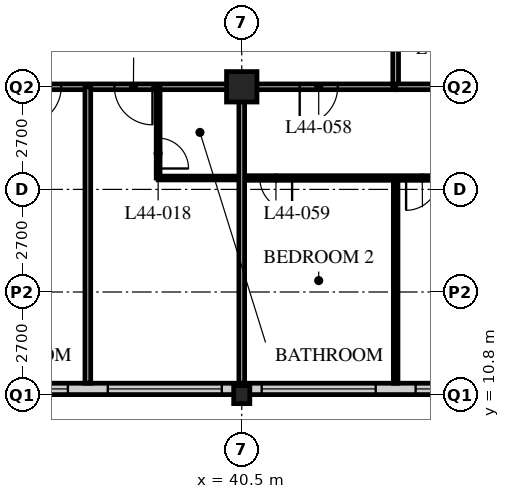
"""IFC4 building model, lengths in metres.
Left out: names, types, materials, properties, quantities, classifications, styles, units other than length and angle.
Written with IfcOpenShell. Run it as: python <this file> out.ifc"""

import sys

from ifc_helpers import new_model, si_unit, direction, frame, frame_2d, origin, origin_2d, place, context, subcontext, project, spatial, rectangle, hollow_rectangle, i_section, extrude, element, fill, save


model = new_model("IFC4")
c1 = context("Model", 3, precision=1e-05, world=origin(), true_north=direction((0.0, 1.0)))
c2 = subcontext(c1, "Body", "Model", "MODEL_VIEW")
j1 = project(units=[si_unit("LENGTHUNIT", "METRE"), si_unit("PLANEANGLEUNIT", "RADIAN")], contexts=[c1])
p1 = place(None, origin())
s1 = spatial("IfcSite", under=j1, at=p1, CompositionType="ELEMENT")
p2 = place(p1, origin())
s2 = spatial("IfcBuilding", under=s1, at=p2, CompositionType="ELEMENT")
p3 = place(p2, frame((0.0, 0.0, 174.0)))
s3 = spatial("IfcBuildingStorey", under=s2, at=p3, CompositionType="ELEMENT", Elevation=174.0)
p4 = place(p3, frame((40.5, 10.8, 0.0), z_axis=(0.0, 0.0, 1.0), x_axis=(1.0, 0.0, 0.0)))
e1 = element("IfcColumn", 1, at=p4, inside=s3, PredefinedType="COLUMN", context=c2, shape_type="SweptSolid", body=[
    extrude(i_section(OverallWidth=0.424, OverallDepth=0.475, WebThickness=0.048, FlangeThickness=0.077, FilletRadius=0.015, at=origin_2d()), origin(), (0.0, 0.0, 1.0), 3.6),
])
p5 = place(p3, frame((40.5, 18.9, 0.0), z_axis=(0.0, 0.0, 1.0), x_axis=(1.0, 0.0, 0.0)))
e2 = element("IfcColumn", 2, at=p5, inside=s3, PredefinedType="COLUMN", context=c2, shape_type="SweptSolid", body=[
    extrude(hollow_rectangle(XDim=0.8, YDim=0.8, WallThickness=0.08, at=origin_2d()), origin(), (0.0, 0.0, 1.0), 3.6),
])
p6 = place(p3, frame((8.4, 10.95, 0.0), z_axis=(0.0, 0.0, 1.0), x_axis=(1.0, 0.0, 0.0)))
e3 = element("IfcWall", 3, at=p6, inside=s3, PredefinedType="SOLIDWALL", context=c2, shape_type="SweptSolid", body=[
    extrude(rectangle(XDim=40.2, YDim=0.3, at=frame_2d((20.1, 0.0))), origin(), (0.0, 0.0, 1.0), 3.39),
])
p7 = place(p6, frame((0.225, 0.0, 0.6)))
e4 = element("IfcOpeningElement", 4, at=p7, cuts=e3, PredefinedType="OPENING", context=c2, shape_type="SweptSolid", body=[
    extrude(rectangle(XDim=3.0, YDim=2.4, at=frame_2d((1.5, 1.2))), frame((0.0, 0.16, 0.0), z_axis=(0.0, -1.0, 0.0), x_axis=(1.0, 0.0, 0.0)), (0.0, 0.0, 1.0), 0.32),
])
p8 = place(p6, frame((4.275, 0.0, 0.6)))
e5 = element("IfcOpeningElement", 5, at=p8, cuts=e3, PredefinedType="OPENING", context=c2, shape_type="SweptSolid", body=[
    extrude(rectangle(XDim=3.0, YDim=2.4, at=frame_2d((1.5, 1.2))), frame((0.0, 0.16, 0.0), z_axis=(0.0, -1.0, 0.0), x_axis=(1.0, 0.0, 0.0)), (0.0, 0.0, 1.0), 0.32),
])
p9 = place(p6, frame((8.325, 0.0, 0.6)))
e6 = element("IfcOpeningElement", 6, at=p9, cuts=e3, PredefinedType="OPENING", context=c2, shape_type="SweptSolid", body=[
    extrude(rectangle(XDim=3.0, YDim=2.4, at=frame_2d((1.5, 1.2))), frame((0.0, 0.16, 0.0), z_axis=(0.0, -1.0, 0.0), x_axis=(1.0, 0.0, 0.0)), (0.0, 0.0, 1.0), 0.32),
])
p10 = place(p6, frame((12.375, 0.0, 0.6)))
e7 = element("IfcOpeningElement", 7, at=p10, cuts=e3, PredefinedType="OPENING", context=c2, shape_type="SweptSolid", body=[
    extrude(rectangle(XDim=3.0, YDim=2.4, at=frame_2d((1.5, 1.2))), frame((0.0, 0.16, 0.0), z_axis=(0.0, -1.0, 0.0), x_axis=(1.0, 0.0, 0.0)), (0.0, 0.0, 1.0), 0.32),
])
p11 = place(p6, frame((16.425, 0.0, 0.6)))
e8 = element("IfcOpeningElement", 8, at=p11, cuts=e3, PredefinedType="OPENING", context=c2, shape_type="SweptSolid", body=[
    extrude(rectangle(XDim=3.0, YDim=2.4, at=frame_2d((1.5, 1.2))), frame((0.0, 0.16, 0.0), z_axis=(0.0, -1.0, 0.0), x_axis=(1.0, 0.0, 0.0)), (0.0, 0.0, 1.0), 0.32),
])
p12 = place(p6, frame((20.475, 0.0, 0.6)))
e9 = element("IfcOpeningElement", 9, at=p12, cuts=e3, PredefinedType="OPENING", context=c2, shape_type="SweptSolid", body=[
    extrude(rectangle(XDim=3.0, YDim=2.4, at=frame_2d((1.5, 1.2))), frame((0.0, 0.16, 0.0), z_axis=(0.0, -1.0, 0.0), x_axis=(1.0, 0.0, 0.0)), (0.0, 0.0, 1.0), 0.32),
])
p13 = place(p6, frame((24.525, 0.0, 0.6)))
e10 = element("IfcOpeningElement", 10, at=p13, cuts=e3, PredefinedType="OPENING", context=c2, shape_type="SweptSolid", body=[
    extrude(rectangle(XDim=3.0, YDim=2.4, at=frame_2d((1.5, 1.2))), frame((0.0, 0.16, 0.0), z_axis=(0.0, -1.0, 0.0), x_axis=(1.0, 0.0, 0.0)), (0.0, 0.0, 1.0), 0.32),
])
p14 = place(p6, frame((28.575, 0.0, 0.6)))
e11 = element("IfcOpeningElement", 11, at=p14, cuts=e3, PredefinedType="OPENING", context=c2, shape_type="SweptSolid", body=[
    extrude(rectangle(XDim=3.0, YDim=2.4, at=frame_2d((1.5, 1.2))), frame((0.0, 0.16, 0.0), z_axis=(0.0, -1.0, 0.0), x_axis=(1.0, 0.0, 0.0)), (0.0, 0.0, 1.0), 0.32),
])
p15 = place(p6, frame((32.625, 0.0, 0.6)))
e12 = element("IfcOpeningElement", 12, at=p15, cuts=e3, PredefinedType="OPENING", context=c2, shape_type="SweptSolid", body=[
    extrude(rectangle(XDim=3.0, YDim=2.4, at=frame_2d((1.5, 1.2))), frame((0.0, 0.16, 0.0), z_axis=(0.0, -1.0, 0.0), x_axis=(1.0, 0.0, 0.0)), (0.0, 0.0, 1.0), 0.32),
])
p16 = place(p6, frame((36.675, 0.0, 0.6)))
e13 = element("IfcOpeningElement", 13, at=p16, cuts=e3, PredefinedType="OPENING", context=c2, shape_type="SweptSolid", body=[
    extrude(rectangle(XDim=3.0, YDim=2.4, at=frame_2d((1.5, 1.2))), frame((0.0, 0.16, 0.0), z_axis=(0.0, -1.0, 0.0), x_axis=(1.0, 0.0, 0.0)), (0.0, 0.0, 1.0), 0.32),
])
p17 = place(p3, frame((12.15, 18.9, 0.0), z_axis=(0.0, 0.0, 1.0), x_axis=(1.0, 0.0, 0.0)))
e14 = element("IfcWall", 14, at=p17, inside=s3, PredefinedType="PARTITIONING", context=c2, shape_type="SweptSolid", body=[
    extrude(rectangle(XDim=32.4, YDim=0.15, at=frame_2d((16.2, 0.0))), origin(), (0.0, 0.0, 1.0), 2.778),
])
p18 = place(p17, frame((6.4, 0.0, 0.0)))
e15 = element("IfcOpeningElement", 15, at=p18, cuts=e14, PredefinedType="OPENING", context=c2, shape_type="SweptSolid", body=[
    extrude(rectangle(XDim=1.0, YDim=2.1, at=frame_2d((0.5, 1.05))), frame((0.0, 0.085, 0.0), z_axis=(0.0, -1.0, 0.0), x_axis=(1.0, 0.0, 0.0)), (0.0, 0.0, 1.0), 0.17),
])
p19 = place(p17, frame((8.8, 0.0, 0.0)))
e16 = element("IfcOpeningElement", 16, at=p19, cuts=e14, PredefinedType="OPENING", context=c2, shape_type="SweptSolid", body=[
    extrude(rectangle(XDim=1.0, YDim=2.1, at=frame_2d((0.5, 1.05))), frame((0.0, 0.085, 0.0), z_axis=(0.0, -1.0, 0.0), x_axis=(1.0, 0.0, 0.0)), (0.0, 0.0, 1.0), 0.17),
])
p20 = place(p17, frame((13.05, 0.0, 0.0)))
e17 = element("IfcOpeningElement", 17, at=p20, cuts=e14, PredefinedType="OPENING", context=c2, shape_type="SweptSolid", body=[
    extrude(rectangle(XDim=1.0, YDim=2.1, at=frame_2d((0.5, 1.05))), frame((0.0, 0.085, 0.0), z_axis=(0.0, -1.0, 0.0), x_axis=(1.0, 0.0, 0.0)), (0.0, 0.0, 1.0), 0.17),
])
p21 = place(p17, frame((22.6, 0.0, 0.0)))
e18 = element("IfcOpeningElement", 18, at=p21, cuts=e14, PredefinedType="OPENING", context=c2, shape_type="SweptSolid", body=[
    extrude(rectangle(XDim=1.0, YDim=2.1, at=frame_2d((0.5, 1.05))), frame((0.0, 0.085, 0.0), z_axis=(0.0, -1.0, 0.0), x_axis=(1.0, 0.0, 0.0)), (0.0, 0.0, 1.0), 0.17),
])
p22 = place(p17, frame((25.0, 0.0, 0.0)))
e19 = element("IfcOpeningElement", 19, at=p22, cuts=e14, PredefinedType="OPENING", context=c2, shape_type="SweptSolid", body=[
    extrude(rectangle(XDim=1.0, YDim=2.1, at=frame_2d((0.5, 1.05))), frame((0.0, 0.085, 0.0), z_axis=(0.0, -1.0, 0.0), x_axis=(1.0, 0.0, 0.0)), (0.0, 0.0, 1.0), 0.17),
])
p23 = place(p17, frame((1.525, 0.0, 0.0)))
e20 = element("IfcOpeningElement", 20, at=p23, cuts=e14, PredefinedType="OPENING", context=c2, shape_type="SweptSolid", body=[
    extrude(rectangle(XDim=1.0, YDim=2.1, at=frame_2d((0.5, 1.05))), frame((0.0, 0.085, 0.0), z_axis=(0.0, -1.0, 0.0), x_axis=(1.0, 0.0, 0.0)), (0.0, 0.0, 1.0), 0.17),
])
p24 = place(p17, frame((29.875, 0.0, 0.0)))
e21 = element("IfcOpeningElement", 21, at=p24, cuts=e14, PredefinedType="OPENING", context=c2, shape_type="SweptSolid", body=[
    extrude(rectangle(XDim=1.0, YDim=2.1, at=frame_2d((0.5, 1.05))), frame((0.0, 0.085, 0.0), z_axis=(0.0, -1.0, 0.0), x_axis=(1.0, 0.0, 0.0)), (0.0, 0.0, 1.0), 0.17),
])
p25 = place(p3, frame((44.55, 18.9, 0.0), z_axis=(0.0, 0.0, 1.0), x_axis=(0.0, 1.0, 0.0)))
e22 = element("IfcWall", 22, at=p25, inside=s3, PredefinedType="PARTITIONING", context=c2, shape_type="SweptSolid", body=[
    extrude(rectangle(XDim=24.3, YDim=0.15, at=frame_2d((12.15, 0.0))), origin(), (0.0, 0.0, 1.0), 3.39),
])
p26 = place(p25, frame((2.35, 0.0, 0.0)))
e23 = element("IfcOpeningElement", 23, at=p26, cuts=e22, PredefinedType="OPENING", context=c2, shape_type="SweptSolid", body=[
    extrude(rectangle(XDim=1.0, YDim=2.1, at=frame_2d((0.5, 1.05))), frame((0.0, 0.085, 0.0), z_axis=(0.0, -1.0, 0.0), x_axis=(1.0, 0.0, 0.0)), (0.0, 0.0, 1.0), 0.17),
])
p27 = place(p25, frame((4.45, 0.0, 0.0)))
e24 = element("IfcOpeningElement", 24, at=p27, cuts=e22, PredefinedType="OPENING", context=c2, shape_type="SweptSolid", body=[
    extrude(rectangle(XDim=1.0, YDim=2.1, at=frame_2d((0.5, 1.05))), frame((0.0, 0.085, 0.0), z_axis=(0.0, -1.0, 0.0), x_axis=(1.0, 0.0, 0.0)), (0.0, 0.0, 1.0), 0.17),
])
p28 = place(p25, frame((18.55, 0.0, 0.0)))
e25 = element("IfcOpeningElement", 25, at=p28, cuts=e22, PredefinedType="OPENING", context=c2, shape_type="SweptSolid", body=[
    extrude(rectangle(XDim=1.0, YDim=2.1, at=frame_2d((0.5, 1.05))), frame((0.0, 0.085, 0.0), z_axis=(0.0, -1.0, 0.0), x_axis=(1.0, 0.0, 0.0)), (0.0, 0.0, 1.0), 0.17),
])
p29 = place(p25, frame((22.6, 0.0, 0.0)))
e26 = element("IfcOpeningElement", 26, at=p29, cuts=e22, PredefinedType="OPENING", context=c2, shape_type="SweptSolid", body=[
    extrude(rectangle(XDim=1.0, YDim=2.1, at=frame_2d((0.5, 1.05))), frame((0.0, 0.085, 0.0), z_axis=(0.0, -1.0, 0.0), x_axis=(1.0, 0.0, 0.0)), (0.0, 0.0, 1.0), 0.17),
])
p30 = place(p3, frame((36.45, 18.9, 0.0), z_axis=(0.0, 0.0, 1.0), x_axis=(0.0, -1.0, 0.0)))
e27 = element("IfcWall", 27, at=p30, inside=s3, PredefinedType="PARTITIONING", context=c2, shape_type="SweptSolid", body=[
    extrude(rectangle(XDim=7.8, YDim=0.15, at=frame_2d((3.9, 0.0))), origin(), (0.0, 0.0, 1.0), 3.39),
])
p31 = place(p3, frame((38.3, 16.5, 0.0), z_axis=(0.0, 0.0, 1.0), x_axis=(1.0, 0.0, 0.0)))
e28 = element("IfcWall", 28, at=p31, inside=s3, PredefinedType="PARTITIONING", context=c2, shape_type="SweptSolid", body=[
    extrude(rectangle(XDim=2.2, YDim=0.1, at=frame_2d((1.1, 0.0))), origin(), (0.0, 0.0, 1.0), 3.39),
])
p32 = place(p3, frame((38.3, 18.9, 0.0), z_axis=(0.0, 0.0, 1.0), x_axis=(0.0, -1.0, 0.0)))
e29 = element("IfcWall", 29, at=p32, inside=s3, PredefinedType="PARTITIONING", context=c2, shape_type="SweptSolid", body=[
    extrude(rectangle(XDim=2.4, YDim=0.1, at=frame_2d((1.2, 0.0))), origin(), (0.0, 0.0, 1.0), 3.39),
])
p33 = place(p32, frame((1.35, 0.0, 0.0)))
e30 = element("IfcOpeningElement", 30, at=p33, cuts=e29, PredefinedType="OPENING", context=c2, shape_type="SweptSolid", body=[
    extrude(rectangle(XDim=0.8, YDim=2.1, at=frame_2d((0.4, 1.05))), frame((0.0, 0.06, 0.0), z_axis=(0.0, -1.0, 0.0), x_axis=(1.0, 0.0, 0.0)), (0.0, 0.0, 1.0), 0.12),
])
p34 = place(p3, frame((40.5, 16.5, 0.0), z_axis=(0.0, 0.0, 1.0), x_axis=(1.0, 0.0, 0.0)))
e31 = element("IfcWall", 31, at=p34, inside=s3, PredefinedType="PARTITIONING", context=c2, shape_type="SweptSolid", body=[
    extrude(rectangle(XDim=8.05, YDim=0.12, at=frame_2d((4.025, 0.0))), origin(), (0.0, 0.0, 1.0), 3.39),
])
p35 = place(p34, frame((0.475, 0.0, 0.0)))
e32 = element("IfcOpeningElement", 32, at=p35, cuts=e31, PredefinedType="OPENING", context=c2, shape_type="SweptSolid", body=[
    extrude(rectangle(XDim=0.85, YDim=2.1, at=frame_2d((0.425, 1.05))), frame((0.0, 0.07, 0.0), z_axis=(0.0, -1.0, 0.0), x_axis=(1.0, 0.0, 0.0)), (0.0, 0.0, 1.0), 0.14),
])
p36 = place(p34, frame((4.325, 0.0, 0.0)))
e33 = element("IfcOpeningElement", 33, at=p36, cuts=e31, PredefinedType="OPENING", context=c2, shape_type="SweptSolid", body=[
    extrude(rectangle(XDim=0.85, YDim=2.1, at=frame_2d((0.425, 1.05))), frame((0.0, 0.07, 0.0), z_axis=(0.0, -1.0, 0.0), x_axis=(1.0, 0.0, 0.0)), (0.0, 0.0, 1.0), 0.14),
])
p37 = place(p3, frame((44.55, 16.5, 0.0), z_axis=(0.0, 0.0, 1.0), x_axis=(0.0, -1.0, 0.0)))
e34 = element("IfcWall", 34, at=p37, inside=s3, PredefinedType="PARTITIONING", context=c2, shape_type="SweptSolid", body=[
    extrude(rectangle(XDim=5.4, YDim=0.12, at=frame_2d((2.7, 0.0))), origin(), (0.0, 0.0, 1.0), 3.39),
])
p38 = place(p3, frame((44.55, 18.9, 0.0), z_axis=(0.0, 0.0, 1.0), x_axis=(1.0, 0.0, 0.0)))
e35 = element("IfcWall", 35, at=p38, inside=s3, PredefinedType="PARTITIONING", context=c2, shape_type="SweptSolid", body=[
    extrude(rectangle(XDim=7.8, YDim=0.15, at=frame_2d((3.9, 0.0))), origin(), (0.0, 0.0, 1.0), 2.778),
])
p39 = place(p3, frame((40.5, 18.9, 0.0), z_axis=(0.0, 0.0, 1.0), x_axis=(0.0, -1.0, 0.0)))
e36 = element("IfcWall", 36, at=p39, inside=s3, PredefinedType="PARTITIONING", context=c2, shape_type="SweptSolid", body=[
    extrude(rectangle(XDim=7.8, YDim=0.15, at=frame_2d((3.9, 0.0))), origin(), (0.0, 0.0, 1.0), 2.778),
])
p40 = place(p13, origin())
e37 = element("IfcWindow", 37, at=p40, inside=s3, PartitioningType="SINGLE_PANEL", PredefinedType="WINDOW", context=c2, shape_type="SweptSolid", body=[
    extrude(rectangle(XDim=3.0, YDim=2.4, at=frame_2d((1.5, 1.2))), frame((0.0, 0.03, 0.0), z_axis=(0.0, -1.0, 0.0), x_axis=(1.0, 0.0, 0.0)), (0.0, 0.0, 1.0), 0.06),
])
fill(e10, e37)
p41 = place(p14, origin())
e38 = element("IfcWindow", 38, at=p41, inside=s3, PartitioningType="SINGLE_PANEL", PredefinedType="WINDOW", context=c2, shape_type="SweptSolid", body=[
    extrude(rectangle(XDim=3.0, YDim=2.4, at=frame_2d((1.5, 1.2))), frame((0.0, 0.03, 0.0), z_axis=(0.0, -1.0, 0.0), x_axis=(1.0, 0.0, 0.0)), (0.0, 0.0, 1.0), 0.06),
])
fill(e11, e38)
p42 = place(p15, origin())
e39 = element("IfcWindow", 39, at=p42, inside=s3, PartitioningType="SINGLE_PANEL", PredefinedType="WINDOW", context=c2, shape_type="SweptSolid", body=[
    extrude(rectangle(XDim=3.0, YDim=2.4, at=frame_2d((1.5, 1.2))), frame((0.0, 0.03, 0.0), z_axis=(0.0, -1.0, 0.0), x_axis=(1.0, 0.0, 0.0)), (0.0, 0.0, 1.0), 0.06),
])
fill(e12, e39)
p43 = place(p16, origin())
e40 = element("IfcWindow", 40, at=p43, inside=s3, PartitioningType="SINGLE_PANEL", PredefinedType="WINDOW", context=c2, shape_type="SweptSolid", body=[
    extrude(rectangle(XDim=3.0, YDim=2.4, at=frame_2d((1.5, 1.2))), frame((0.0, 0.03, 0.0), z_axis=(0.0, -1.0, 0.0), x_axis=(1.0, 0.0, 0.0)), (0.0, 0.0, 1.0), 0.06),
])
fill(e13, e40)
p44 = place(p21, origin())
e41 = element("IfcDoor", 41, at=p44, inside=s3, OperationType="SINGLE_SWING_RIGHT", PredefinedType="DOOR", context=c2, shape_type="SweptSolid", body=[
    extrude(rectangle(XDim=1.0, YDim=2.1, at=frame_2d((0.5, 1.05))), frame((0.0, 0.025, 0.0), z_axis=(0.0, -1.0, 0.0), x_axis=(1.0, 0.0, 0.0)), (0.0, 0.0, 1.0), 0.05),
])
fill(e18, e41)
p45 = place(p33, origin())
e42 = element("IfcDoor", 42, at=p45, inside=s3, OperationType="SINGLE_SWING_RIGHT", PredefinedType="DOOR", context=c2, shape_type="SweptSolid", body=[
    extrude(rectangle(XDim=0.8, YDim=2.1, at=frame_2d((0.4, 1.05))), frame((0.0, 0.025, 0.0), z_axis=(0.0, -1.0, 0.0), x_axis=(1.0, 0.0, 0.0)), (0.0, 0.0, 1.0), 0.05),
])
fill(e30, e42)
p46 = place(p22, origin())
e43 = element("IfcDoor", 43, at=p46, inside=s3, OperationType="SINGLE_SWING_LEFT", PredefinedType="DOOR", context=c2, shape_type="SweptSolid", body=[
    extrude(rectangle(XDim=1.0, YDim=2.1, at=frame_2d((0.5, 1.05))), frame((0.0, 0.025, 0.0), z_axis=(0.0, -1.0, 0.0), x_axis=(1.0, 0.0, 0.0)), (0.0, 0.0, 1.0), 0.05),
])
fill(e19, e43)
p47 = place(p24, origin())
e44 = element("IfcDoor", 44, at=p47, inside=s3, OperationType="SINGLE_SWING_RIGHT", PredefinedType="DOOR", context=c2, shape_type="SweptSolid", body=[
    extrude(rectangle(XDim=1.0, YDim=2.1, at=frame_2d((0.5, 1.05))), frame((0.0, 0.025, 0.0), z_axis=(0.0, -1.0, 0.0), x_axis=(1.0, 0.0, 0.0)), (0.0, 0.0, 1.0), 0.05),
])
fill(e21, e44)
p48 = place(p35, origin())
e45 = element("IfcDoor", 45, at=p48, inside=s3, OperationType="SINGLE_SWING_LEFT", PredefinedType="DOOR", context=c2, shape_type="SweptSolid", body=[
    extrude(rectangle(XDim=0.85, YDim=2.1, at=frame_2d((0.425, 1.05))), frame((0.0, 0.025, 0.0), z_axis=(0.0, -1.0, 0.0), x_axis=(1.0, 0.0, 0.0)), (0.0, 0.0, 1.0), 0.05),
])
fill(e32, e45)
p49 = place(p36, origin())
e46 = element("IfcDoor", 46, at=p49, inside=s3, OperationType="SINGLE_SWING_RIGHT", PredefinedType="DOOR", context=c2, shape_type="SweptSolid", body=[
    extrude(rectangle(XDim=0.85, YDim=2.1, at=frame_2d((0.425, 1.05))), frame((0.0, 0.025, 0.0), z_axis=(0.0, -1.0, 0.0), x_axis=(1.0, 0.0, 0.0)), (0.0, 0.0, 1.0), 0.05),
])
fill(e33, e46)
save(model, sys.argv[1])
